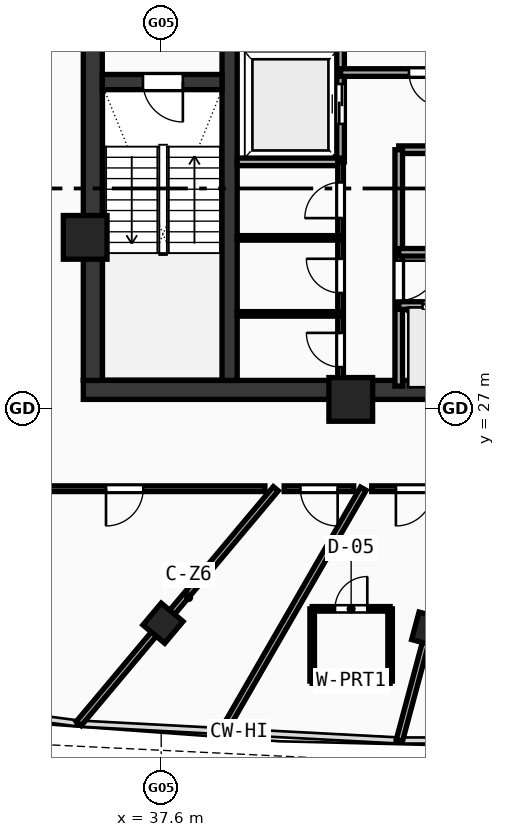
"""IFC4 building model, lengths in metres.
Left out: names, types, materials, properties, quantities, classifications, styles, units other than length and angle.
Written with IfcOpenShell. Run it as: python <this file> out.ifc"""

import sys

from ifc_helpers import new_model, si_unit, direction, frame, frame_2d, origin, origin_with_axes, origin_2d, place, context, subcontext, project, spatial, rectangle, hollow_rectangle, extrude, source, transform, mapped, element, fill, save


model = new_model("IFC4")
c1 = context("Model", 3, precision=1e-05, world=origin(), true_north=direction((0.0, 1.0)))
c2 = subcontext(c1, "Body", "Model", "MODEL_VIEW")
j1 = project(units=[si_unit("LENGTHUNIT", "METRE"), si_unit("PLANEANGLEUNIT", "RADIAN")], contexts=[c1])
p1 = place(None, origin())
s1 = spatial("IfcSite", under=j1, at=p1, CompositionType="ELEMENT")
p2 = place(p1, origin())
s2 = spatial("IfcBuilding", under=s1, at=p2, CompositionType="ELEMENT")
p3 = place(p2, frame((0.0, 0.0, 277.56)))
s3 = spatial("IfcBuildingStorey", under=s2, at=p3, CompositionType="ELEMENT", Elevation=277.56)
p4 = place(p3, frame((35.55, 27.5, 0.0), z_axis=(0.0, 0.0, 1.0), x_axis=(1.0, 0.0, 0.0)))
e1 = element("IfcWall", 1, at=p4, inside=s3, PredefinedType="SHEAR", context=c2, shape_type="SweptSolid", body=[
    extrude(rectangle(XDim=24.9, YDim=0.5, at=frame_2d((12.45, 0.0))), origin(), (0.0, 0.0, 1.0), 3.47),
])
p5 = place(p3, frame((35.8, 27.75, 0.0), z_axis=(0.0, 0.0, 1.0), x_axis=(0.0, 1.0, 0.0)))
e2 = element("IfcWall", 2, at=p5, inside=s3, PredefinedType="SHEAR", context=c2, shape_type="SweptSolid", body=[
    extrude(rectangle(XDim=12.2, YDim=0.5, at=frame_2d((6.1, 0.0))), origin(), (0.0, 0.0, 1.0), 3.47),
])
p6 = place(p3, frame((39.4, 27.75, 0.0), z_axis=(0.0, 0.0, 1.0), x_axis=(0.0, 1.0, 0.0)))
e3 = element("IfcWall", 3, at=p6, inside=s3, PredefinedType="SHEAR", context=c2, shape_type="SweptSolid", body=[
    extrude(rectangle(XDim=12.2, YDim=0.4, at=frame_2d((6.1, 0.0))), origin(), (0.0, 0.0, 1.0), 3.47),
])
p7 = place(p6, frame((10.0, 0.0, 0.0)))
e4 = element("IfcOpeningElement", 4, at=p7, cuts=e3, PredefinedType="OPENING", context=c2, shape_type="SweptSolid", body=[
    extrude(rectangle(XDim=1.1, YDim=2.1, at=frame_2d((0.55, 1.05))), frame((0.0, 0.21, 0.0), z_axis=(0.0, -1.0, 0.0), x_axis=(1.0, 0.0, 0.0)), (0.0, 0.0, 1.0), 0.42),
])
p8 = place(p3, frame((36.05, 35.6, 0.0), z_axis=(0.0, 0.0, 1.0), x_axis=(1.0, 0.0, 0.0)))
e5 = element("IfcWall", 5, at=p8, inside=s3, PredefinedType="SHEAR", context=c2, shape_type="SweptSolid", body=[
    extrude(rectangle(XDim=3.15, YDim=0.4, at=frame_2d((1.575, 0.0))), origin(), (0.0, 0.0, 1.0), 3.47),
])
p9 = place(p8, frame((1.07, 0.0, 0.0)))
e6 = element("IfcOpeningElement", 6, at=p9, cuts=e5, PredefinedType="OPENING", context=c2, shape_type="SweptSolid", body=[
    extrude(rectangle(XDim=1.05, YDim=2.1, at=frame_2d((0.525, 1.05))), frame((0.0, 0.21, 0.0), z_axis=(0.0, -1.0, 0.0), x_axis=(1.0, 0.0, 0.0)), (0.0, 0.0, 1.0), 0.42),
])
m1 = source(origin(), c2, "Body", "SweptSolid", [
    extrude(hollow_rectangle(XDim=1.15, YDim=1.15, WallThickness=0.048, at=origin_2d()), origin(), (0.0, 0.0, 1.0), 3.73),
])
for number, where, z_axis, x_axis in (
    (7, (42.588, 27.25, -0.26), (0.0, 0.0, 1.0), (1.0, 0.0, 0.0)),
    (8, (35.6, 31.513, -0.26), (0.0, 0.0, 1.0), (1.0, 0.0, 0.0)),
):
    element("IfcColumn", number, at=place(p3, frame(where, z_axis=z_axis, x_axis=x_axis)), inside=s3, PredefinedType="COLUMN", context=c2, shape_type="MappedRepresentation", body=[
        mapped(m1, transform((0.0, 0.0, 0.0), scale=1.0)),
    ])
m2 = source(origin(), c2, "Body", "SweptSolid", [
    extrude(hollow_rectangle(XDim=0.75, YDim=0.75, WallThickness=0.028, at=origin_2d()), origin(), (0.0, 0.0, 1.0), 3.73),
])
for number, where, z_axis, x_axis in (
    (9, (37.647, 21.362, -0.26), (0.0, 0.0, 1.0), (0.766, -0.643, 0.0)),
    (10, (44.649, 21.196, -0.26), (0.0, 0.0, 1.0), (0.966, -0.259, 0.0)),
):
    element("IfcColumn", number, at=place(p3, frame(where, z_axis=z_axis, x_axis=x_axis)), inside=s3, PredefinedType="COLUMN", context=c2, shape_type="MappedRepresentation", body=[
        mapped(m2, transform((0.0, 0.0, 0.0), scale=1.0)),
    ])
p10 = place(p3, frame((42.32, 33.5, 0.0), z_axis=(0.0, 0.0, 1.0), x_axis=(0.0, 1.0, 0.0)))
e11 = element("IfcWall", 11, at=p10, inside=s3, PredefinedType="SOLIDWALL", context=c2, shape_type="SweptSolid", body=[
    extrude(rectangle(XDim=6.45, YDim=0.2, at=frame_2d((3.225, 0.0))), origin(), (0.0, 0.0, 1.0), 3.47),
])
p11 = place(p10, frame((1.0, 0.0, 0.0)))
e12 = element("IfcOpeningElement", 12, at=p11, cuts=e11, PredefinedType="OPENING", context=c2, shape_type="SweptSolid", body=[
    extrude(rectangle(XDim=1.05, YDim=2.1, at=frame_2d((0.525, 1.05))), frame((0.0, 0.11, 0.0), z_axis=(0.0, -1.0, 0.0), x_axis=(1.0, 0.0, 0.0)), (0.0, 0.0, 1.0), 0.22),
])
p12 = place(p3, frame((39.6, 33.5, 0.0), z_axis=(0.0, 0.0, 1.0), x_axis=(1.0, 0.0, 0.0)))
e13 = element("IfcWall", 13, at=p12, inside=s3, PredefinedType="SOLIDWALL", context=c2, shape_type="SweptSolid", body=[
    extrude(rectangle(XDim=2.72, YDim=0.2, at=frame_2d((1.36, 0.0))), origin(), (0.0, 0.0, 1.0), 3.47),
])
p13 = place(p3, frame((42.32, 35.85, 0.0), z_axis=(0.0, 0.0, 1.0), x_axis=(1.0, 0.0, 0.0)))
e14 = element("IfcWall", 14, at=p13, inside=s3, PredefinedType="SOLIDWALL", context=c2, shape_type="SweptSolid", body=[
    extrude(rectangle(XDim=4.73, YDim=0.2, at=frame_2d((2.365, 0.0))), origin(), (0.0, 0.0, 1.0), 3.47),
])
p14 = place(p13, frame((1.8, 0.0, 0.0)))
e15 = element("IfcOpeningElement", 15, at=p14, cuts=e14, PredefinedType="OPENING", context=c2, shape_type="SweptSolid", body=[
    extrude(rectangle(XDim=0.9, YDim=2.1, at=frame_2d((0.45, 1.05))), frame((0.0, 0.11, 0.0), z_axis=(0.0, -1.0, 0.0), x_axis=(1.0, 0.0, 0.0)), (0.0, 0.0, 1.0), 0.22),
])
p15 = place(p3, frame((43.85, 33.82, 0.0), z_axis=(0.0, 0.0, 1.0), x_axis=(1.0, 0.0, 0.0)))
e16 = element("IfcWall", 16, at=p15, inside=s3, PredefinedType="SOLIDWALL", context=c2, shape_type="SweptSolid", body=[
    extrude(rectangle(XDim=9.83, YDim=0.2, at=frame_2d((4.915, 0.0))), origin(), (0.0, 0.0, 1.0), 3.47),
])
p16 = place(p15, frame((1.2, 0.0, 0.0)))
e17 = element("IfcOpeningElement", 17, at=p16, cuts=e16, PredefinedType="OPENING", context=c2, shape_type="SweptSolid", body=[
    extrude(rectangle(XDim=0.9, YDim=2.1, at=frame_2d((0.45, 1.05))), frame((0.0, 0.11, 0.0), z_axis=(0.0, -1.0, 0.0), x_axis=(1.0, 0.0, 0.0)), (0.0, 0.0, 1.0), 0.22),
])
p17 = place(p15, frame((7.2, 0.0, 0.0)))
e18 = element("IfcOpeningElement", 18, at=p17, cuts=e16, PredefinedType="OPENING", context=c2, shape_type="SweptSolid", body=[
    extrude(rectangle(XDim=0.9, YDim=2.1, at=frame_2d((0.45, 1.05))), frame((0.0, 0.11, 0.0), z_axis=(0.0, -1.0, 0.0), x_axis=(1.0, 0.0, 0.0)), (0.0, 0.0, 1.0), 0.22),
])
p18 = place(p3, frame((43.85, 27.6, 0.0), z_axis=(0.0, 0.0, 1.0), x_axis=(0.0, 1.0, 0.0)))
e19 = element("IfcWall", 19, at=p18, inside=s3, PredefinedType="SOLIDWALL", context=c2, shape_type="SweptSolid", body=[
    extrude(rectangle(XDim=6.22, YDim=0.2, at=frame_2d((3.11, 0.0))), origin(), (0.0, 0.0, 1.0), 3.47),
])
p19 = place(p18, frame((2.25, 0.0, 0.0)))
e20 = element("IfcOpeningElement", 20, at=p19, cuts=e19, PredefinedType="OPENING", context=c2, shape_type="SweptSolid", body=[
    extrude(rectangle(XDim=1.05, YDim=2.1, at=frame_2d((0.525, 1.05))), frame((0.0, 0.11, 0.0), z_axis=(0.0, -1.0, 0.0), x_axis=(1.0, 0.0, 0.0)), (0.0, 0.0, 1.0), 0.22),
])
p20 = place(p3, frame((43.85, 29.72, 0.0), z_axis=(0.0, 0.0, 1.0), x_axis=(1.0, 0.0, 0.0)))
e21 = element("IfcWall", 21, at=p20, inside=s3, PredefinedType="SOLIDWALL", context=c2, shape_type="SweptSolid", body=[
    extrude(rectangle(XDim=7.2, YDim=0.2, at=frame_2d((3.6, 0.0))), origin(), (0.0, 0.0, 1.0), 3.47),
])
p21 = place(p20, frame((0.625, 0.0, 0.0)))
e22 = element("IfcOpeningElement", 22, at=p21, cuts=e21, PredefinedType="OPENING", context=c2, shape_type="SweptSolid", body=[
    extrude(rectangle(XDim=1.05, YDim=2.1, at=frame_2d((0.525, 1.05))), frame((0.0, 0.11, 0.0), z_axis=(0.0, -1.0, 0.0), x_axis=(1.0, 0.0, 0.0)), (0.0, 0.0, 1.0), 0.22),
])
p22 = place(p20, frame((3.075, 0.0, 0.0)))
e23 = element("IfcOpeningElement", 23, at=p22, cuts=e21, PredefinedType="OPENING", context=c2, shape_type="SweptSolid", body=[
    extrude(rectangle(XDim=1.05, YDim=2.1, at=frame_2d((0.525, 1.05))), frame((0.0, 0.11, 0.0), z_axis=(0.0, -1.0, 0.0), x_axis=(1.0, 0.0, 0.0)), (0.0, 0.0, 1.0), 0.22),
])
p23 = place(p20, frame((5.525, 0.0, 0.0)))
e24 = element("IfcOpeningElement", 24, at=p23, cuts=e21, PredefinedType="OPENING", context=c2, shape_type="SweptSolid", body=[
    extrude(rectangle(XDim=1.05, YDim=2.1, at=frame_2d((0.525, 1.05))), frame((0.0, 0.11, 0.0), z_axis=(0.0, -1.0, 0.0), x_axis=(1.0, 0.0, 0.0)), (0.0, 0.0, 1.0), 0.22),
])
p24 = place(p3, frame((43.85, 31.12, 0.0), z_axis=(0.0, 0.0, 1.0), x_axis=(1.0, 0.0, 0.0)))
e25 = element("IfcWall", 25, at=p24, inside=s3, PredefinedType="SOLIDWALL", context=c2, shape_type="SweptSolid", body=[
    extrude(rectangle(XDim=9.83, YDim=0.2, at=frame_2d((4.915, 0.0))), origin(), (0.0, 0.0, 1.0), 3.47),
])
p25 = place(p3, frame((42.32, 27.6, 0.0), z_axis=(0.0, 0.0, 1.0), x_axis=(0.0, 1.0, 0.0)))
e26 = element("IfcWall", 26, at=p25, inside=s3, PredefinedType="PARTITIONING", context=c2, shape_type="SweptSolid", body=[
    extrude(rectangle(XDim=5.9, YDim=0.15, at=frame_2d((2.95, 0.0))), origin(), (0.0, 0.0, 1.0), 3.47),
])
p26 = place(p25, frame((0.5, 0.0, 0.0)))
e27 = element("IfcOpeningElement", 27, at=p26, cuts=e26, PredefinedType="OPENING", context=c2, shape_type="SweptSolid", body=[
    extrude(rectangle(XDim=0.9, YDim=2.1, at=frame_2d((0.45, 1.05))), frame((0.0, 0.085, 0.0), z_axis=(0.0, -1.0, 0.0), x_axis=(1.0, 0.0, 0.0)), (0.0, 0.0, 1.0), 0.17),
])
p27 = place(p25, frame((2.45, 0.0, 0.0)))
e28 = element("IfcOpeningElement", 28, at=p27, cuts=e26, PredefinedType="OPENING", context=c2, shape_type="SweptSolid", body=[
    extrude(rectangle(XDim=0.9, YDim=2.1, at=frame_2d((0.45, 1.05))), frame((0.0, 0.085, 0.0), z_axis=(0.0, -1.0, 0.0), x_axis=(1.0, 0.0, 0.0)), (0.0, 0.0, 1.0), 0.17),
])
p28 = place(p25, frame((4.42, 0.0, 0.0)))
e29 = element("IfcOpeningElement", 29, at=p28, cuts=e26, PredefinedType="OPENING", context=c2, shape_type="SweptSolid", body=[
    extrude(rectangle(XDim=0.94, YDim=2.1, at=frame_2d((0.47, 1.05))), frame((0.0, 0.085, 0.0), z_axis=(0.0, -1.0, 0.0), x_axis=(1.0, 0.0, 0.0)), (0.0, 0.0, 1.0), 0.17),
])
for number, where, z_axis, x_axis in (
    (30, (39.6, 29.5, 0.0), (0.0, 0.0, 1.0), (1.0, 0.0, 0.0)),
    (31, (39.6, 31.5, 0.0), (0.0, 0.0, 1.0), (1.0, 0.0, 0.0)),
):
    element("IfcWall", number, at=place(p3, frame(where, z_axis=z_axis, x_axis=x_axis)), inside=s3, PredefinedType="PARTITIONING", context=c2, shape_type="SweptSolid", body=[
        extrude(rectangle(XDim=2.72, YDim=0.12, at=frame_2d((1.36, 0.0))), origin(), (0.0, 0.0, 1.0), 3.47),
    ])
p29 = place(p3, frame((40.616, 24.9, 0.0), z_axis=(0.0, 0.0, 1.0), x_axis=(-0.642788791497, -0.76604345146, 0.0)))
e32 = element("IfcWall", 32, at=p29, inside=s3, PredefinedType="PARTITIONING", context=c2, shape_type="SweptSolid", body=[
    extrude(rectangle(XDim=8.066, YDim=0.17, at=frame_2d((4.033, 0.0))), origin(), (0.0, 0.0, 1.0), 2.87),
])
p30 = place(p3, frame((42.919, 24.9, 0.0), z_axis=(0.0, 0.0, 1.0), x_axis=(-0.499992114976, -0.866029956157, 0.0)))
e33 = element("IfcWall", 33, at=p30, inside=s3, PredefinedType="PARTITIONING", context=c2, shape_type="SweptSolid", body=[
    extrude(rectangle(XDim=7.367, YDim=0.17, at=frame_2d((3.683, 0.0))), origin(), (0.0, 0.0, 1.0), 2.87),
])
p31 = place(p3, frame((45.642, 24.9, 0.0), z_axis=(0.0, 0.0, 1.0), x_axis=(-0.258825643191, -0.965924058312, 0.0)))
e34 = element("IfcWall", 34, at=p31, inside=s3, PredefinedType="PARTITIONING", context=c2, shape_type="SweptSolid", body=[
    extrude(rectangle(XDim=6.858, YDim=0.17, at=frame_2d((3.429, 0.0))), origin(), (0.0, 0.0, 1.0), 2.87),
])
p32 = place(p3, frame((45.414, 24.9, 0.0), z_axis=(0.0, 0.0, 1.0), x_axis=(-1.0, 0.0, 0.0)))
e35 = element("IfcWall", 35, at=p32, inside=s3, PredefinedType="PARTITIONING", context=c2, shape_type="SweptSolid", body=[
    extrude(rectangle(XDim=2.275, YDim=0.15, at=frame_2d((1.138, 0.0))), origin(), (0.0, 0.0, 1.0), 3.47),
])
p33 = place(p32, frame((0.658, 0.0, 0.0)))
e36 = element("IfcOpeningElement", 36, at=p33, cuts=e35, PredefinedType="OPENING", context=c2, shape_type="SweptSolid", body=[
    extrude(rectangle(XDim=0.98, YDim=2.12, at=frame_2d((0.49, 1.06))), frame((0.0, 0.085, 0.0), z_axis=(0.0, -1.0, 0.0), x_axis=(1.0, 0.0, 0.0)), (0.0, 0.0, 1.0), 0.17),
])
p34 = place(p3, frame((42.665, 24.9, 0.0), z_axis=(0.0, 0.0, 1.0), x_axis=(-1.0, 0.0, 0.0)))
e37 = element("IfcWall", 37, at=p34, inside=s3, PredefinedType="PARTITIONING", context=c2, shape_type="SweptSolid", body=[
    extrude(rectangle(XDim=1.83, YDim=0.15, at=frame_2d((0.915, 0.0))), origin(), (0.0, 0.0, 1.0), 3.47),
])
p35 = place(p34, frame((0.423, 0.0, 0.0)))
e38 = element("IfcOpeningElement", 38, at=p35, cuts=e37, PredefinedType="OPENING", context=c2, shape_type="SweptSolid", body=[
    extrude(rectangle(XDim=0.98, YDim=2.12, at=frame_2d((0.49, 1.06))), frame((0.0, 0.085, 0.0), z_axis=(0.0, -1.0, 0.0), x_axis=(1.0, 0.0, 0.0)), (0.0, 0.0, 1.0), 0.17),
])
p36 = place(p3, frame((40.329, 24.9, 0.0), z_axis=(0.0, 0.0, 1.0), x_axis=(-1.0, 0.0, 0.0)))
e39 = element("IfcWall", 39, at=p36, inside=s3, PredefinedType="PARTITIONING", context=c2, shape_type="SweptSolid", body=[
    extrude(rectangle(XDim=7.179, YDim=0.15, at=frame_2d((3.589, 0.0))), origin(), (0.0, 0.0, 1.0), 3.12),
])
p37 = place(p36, frame((3.201, 0.0, 0.0)))
e40 = element("IfcOpeningElement", 40, at=p37, cuts=e39, PredefinedType="OPENING", context=c2, shape_type="SweptSolid", body=[
    extrude(rectangle(XDim=0.98, YDim=2.12, at=frame_2d((0.49, 1.06))), frame((0.0, 0.085, 0.0), z_axis=(0.0, -1.0, 0.0), x_axis=(1.0, 0.0, 0.0)), (0.0, 0.0, 1.0), 0.17),
])
p38 = place(p3, frame((41.573, 19.839, 0.0), z_axis=(0.0, 0.0, 1.0), x_axis=(1.0, 0.0, 0.0)))
e41 = element("IfcWall", 41, at=p38, inside=s3, PredefinedType="PARTITIONING", context=c2, shape_type="SweptSolid", body=[
    extrude(rectangle(XDim=2.05, YDim=0.12, at=frame_2d((1.025, 0.0))), origin(), (0.0, 0.0, 1.0), 3.47),
])
p39 = place(p3, frame((43.623, 19.839, 0.0), z_axis=(0.0, 0.0, 1.0), x_axis=(0.0, 1.0, 0.0)))
e42 = element("IfcWall", 42, at=p39, inside=s3, PredefinedType="PARTITIONING", context=c2, shape_type="SweptSolid", body=[
    extrude(rectangle(XDim=1.9, YDim=0.12, at=frame_2d((0.95, 0.0))), origin(), (0.0, 0.0, 1.0), 2.87),
])
p40 = place(p3, frame((43.623, 21.739, 0.0), z_axis=(0.0, 0.0, 1.0), x_axis=(-1.0, 0.0, 0.0)))
e43 = element("IfcWall", 43, at=p40, inside=s3, PredefinedType="PARTITIONING", context=c2, shape_type="SweptSolid", body=[
    extrude(rectangle(XDim=2.05, YDim=0.12, at=frame_2d((1.025, 0.0))), origin(), (0.0, 0.0, 1.0), 3.47),
])
p41 = place(p40, frame((0.6, 0.0, 0.0)))
e44 = element("IfcOpeningElement", 44, at=p41, cuts=e43, PredefinedType="OPENING", context=c2, shape_type="SweptSolid", body=[
    extrude(rectangle(XDim=0.85, YDim=2.1, at=frame_2d((0.425, 1.05))), frame((0.0, 0.07, 0.0), z_axis=(0.0, -1.0, 0.0), x_axis=(1.0, 0.0, 0.0)), (0.0, 0.0, 1.0), 0.14),
])
p42 = place(p3, frame((41.573, 21.739, 0.0), z_axis=(0.0, 0.0, 1.0), x_axis=(0.0, -1.0, 0.0)))
e45 = element("IfcWall", 45, at=p42, inside=s3, PredefinedType="PARTITIONING", context=c2, shape_type="SweptSolid", body=[
    extrude(rectangle(XDim=1.9, YDim=0.12, at=frame_2d((0.95, 0.0))), origin(), (0.0, 0.0, 1.0), 2.87),
])
m3 = source(origin(), c2, "Body", "SweptSolid", [
    extrude(rectangle(XDim=1.05, YDim=2.1, at=frame_2d((0.525, 1.05))), frame((0.0, 0.025, 0.0), z_axis=(0.0, -1.0, 0.0), x_axis=(1.0, 0.0, 0.0)), (0.0, 0.0, 1.0), 0.05),
])
p43 = place(p9, frame((1.05, 0.0, 0.0), z_axis=(0.0, 0.0, 1.0), x_axis=(-1.0, 0.0, 0.0)))
e46 = element("IfcDoor", 46, at=p43, inside=s3, OperationType="SINGLE_SWING_LEFT", PredefinedType="DOOR", context=c2, shape_type="MappedRepresentation", body=[
    mapped(m3, transform((0.0, 0.0, 0.0), scale=1.0)),
])
fill(e6, e46)
p44 = place(p11, origin_with_axes())
e47 = element("IfcDoor", 47, at=p44, inside=s3, OperationType="DOUBLE_DOOR_SLIDING", PredefinedType="DOOR", context=c2, shape_type="MappedRepresentation", body=[
    mapped(m3, transform((0.0, 0.0, 0.0), scale=1.0)),
])
fill(e12, e47)
m4 = source(origin(), c2, "Body", "SweptSolid", [
    extrude(rectangle(XDim=0.9, YDim=2.1, at=frame_2d((0.45, 1.05))), frame((0.0, 0.025, 0.0), z_axis=(0.0, -1.0, 0.0), x_axis=(1.0, 0.0, 0.0)), (0.0, 0.0, 1.0), 0.05),
])
p45 = place(p14, frame((0.9, 0.0, 0.0), z_axis=(0.0, 0.0, 1.0), x_axis=(-1.0, 0.0, 0.0)))
e48 = element("IfcDoor", 48, at=p45, inside=s3, OperationType="SINGLE_SWING_LEFT", PredefinedType="DOOR", context=c2, shape_type="MappedRepresentation", body=[
    mapped(m4, transform((0.0, 0.0, 0.0), scale=1.0)),
])
fill(e15, e48)
p46 = place(p19, frame((1.05, 0.0, 0.0), z_axis=(0.0, 0.0, 1.0), x_axis=(-1.0, 0.0, 0.0)))
e49 = element("IfcDoor", 49, at=p46, inside=s3, OperationType="SINGLE_SWING_LEFT", PredefinedType="DOOR", context=c2, shape_type="MappedRepresentation", body=[
    mapped(m3, transform((0.0, 0.0, 0.0), scale=1.0)),
])
fill(e20, e49)
p47 = place(p21, origin_with_axes())
e50 = element("IfcDoor", 50, at=p47, inside=s3, OperationType="DOUBLE_DOOR_SLIDING", PredefinedType="DOOR", context=c2, shape_type="MappedRepresentation", body=[
    mapped(m3, transform((0.0, 0.0, 0.0), scale=1.0)),
])
fill(e22, e50)
p48 = place(p26, origin_with_axes())
e51 = element("IfcDoor", 51, at=p48, inside=s3, OperationType="SINGLE_SWING_RIGHT", PredefinedType="DOOR", context=c2, shape_type="MappedRepresentation", body=[
    mapped(m4, transform((0.0, 0.0, 0.0), scale=1.0)),
])
fill(e27, e51)
p49 = place(p27, origin_with_axes())
e52 = element("IfcDoor", 52, at=p49, inside=s3, OperationType="SINGLE_SWING_RIGHT", PredefinedType="DOOR", context=c2, shape_type="MappedRepresentation", body=[
    mapped(m4, transform((0.0, 0.0, 0.0), scale=1.0)),
])
fill(e28, e52)
m5 = source(origin(), c2, "Body", "SweptSolid", [
    extrude(rectangle(XDim=0.94, YDim=2.1, at=frame_2d((0.47, 1.05))), frame((0.0, 0.025, 0.0), z_axis=(0.0, -1.0, 0.0), x_axis=(1.0, 0.0, 0.0)), (0.0, 0.0, 1.0), 0.05),
])
p50 = place(p28, origin_with_axes())
e53 = element("IfcDoor", 53, at=p50, inside=s3, OperationType="SINGLE_SWING_LEFT", PredefinedType="DOOR", context=c2, shape_type="MappedRepresentation", body=[
    mapped(m5, transform((0.0, 0.0, 0.0), scale=1.0)),
])
fill(e29, e53)
m6 = source(origin(), c2, "Body", "SweptSolid", [
    extrude(rectangle(XDim=0.98, YDim=2.12, at=frame_2d((0.49, 1.06))), frame((0.0, 0.025, 0.0), z_axis=(0.0, -1.0, 0.0), x_axis=(1.0, 0.0, 0.0)), (0.0, 0.0, 1.0), 0.05),
])
p51 = place(p37, origin_with_axes())
e54 = element("IfcDoor", 54, at=p51, inside=s3, OperationType="SINGLE_SWING_RIGHT", PredefinedType="DOOR", context=c2, shape_type="MappedRepresentation", body=[
    mapped(m6, transform((0.0, 0.0, 0.0), scale=1.0)),
])
fill(e40, e54)
p52 = place(p35, origin_with_axes())
e55 = element("IfcDoor", 55, at=p52, inside=s3, OperationType="SINGLE_SWING_LEFT", PredefinedType="DOOR", context=c2, shape_type="MappedRepresentation", body=[
    mapped(m6, transform((0.0, 0.0, 0.0), scale=1.0)),
])
fill(e38, e55)
p53 = place(p33, origin_with_axes())
e56 = element("IfcDoor", 56, at=p53, inside=s3, OperationType="SINGLE_SWING_RIGHT", PredefinedType="DOOR", context=c2, shape_type="MappedRepresentation", body=[
    mapped(m6, transform((0.0, 0.0, 0.0), scale=1.0)),
])
fill(e36, e56)
m7 = source(origin(), c2, "Body", "SweptSolid", [
    extrude(rectangle(XDim=0.85, YDim=2.1, at=frame_2d((0.425, 1.05))), frame((0.0, 0.025, 0.0), z_axis=(0.0, -1.0, 0.0), x_axis=(1.0, 0.0, 0.0)), (0.0, 0.0, 1.0), 0.05),
])
p54 = place(p41, frame((0.85, 0.0, 0.0), z_axis=(0.0, 0.0, 1.0), x_axis=(-1.0, 0.0, 0.0)))
e57 = element("IfcDoor", 57, at=p54, inside=s3, OperationType="SINGLE_SWING_RIGHT", PredefinedType="DOOR", context=c2, shape_type="MappedRepresentation", body=[
    mapped(m7, transform((0.0, 0.0, 0.0), scale=1.0)),
])
fill(e44, e57)
save(model, sys.argv[1])
